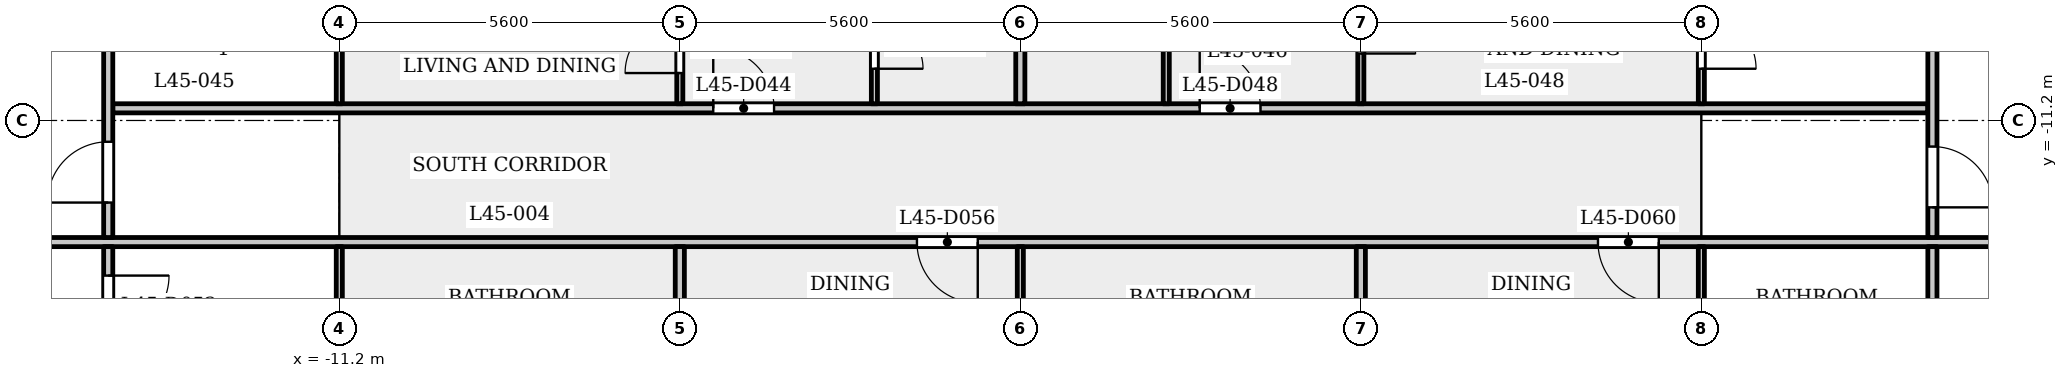
"""IFC4 building model, lengths in metres.
Left out: names, types, materials, properties, quantities, classifications, styles, units other than length and angle.
Written with IfcOpenShell. Run it as: python <this file> out.ifc"""

import sys

from ifc_helpers import new_model, si_unit, direction, frame, frame_2d, origin, place, context, subcontext, project, spatial, rectangle, extrude, element, fill, save


model = new_model("IFC4")
c1 = context("Model", 3, precision=1e-05, world=origin(), true_north=direction((0.0, 1.0)))
c2 = subcontext(c1, "Body", "Model", "MODEL_VIEW")
j1 = project(units=[si_unit("LENGTHUNIT", "METRE"), si_unit("PLANEANGLEUNIT", "RADIAN")], contexts=[c1])
p1 = place(None, origin())
s1 = spatial("IfcSite", under=j1, at=p1, CompositionType="ELEMENT")
p2 = place(p1, origin())
s2 = spatial("IfcBuilding", under=s1, at=p2, CompositionType="ELEMENT")
p3 = place(p2, frame((0.0, 0.0, 174.6)))
s3 = spatial("IfcBuildingStorey", under=s2, at=p3, CompositionType="ELEMENT", Elevation=174.6)
p4 = place(p3, frame((-17.4, -13.2, 0.0), z_axis=(0.0, 0.0, 1.0), x_axis=(1.0, 0.0, 0.0)))
e1 = element("IfcWall", 1, at=p4, inside=s3, PredefinedType="PARTITIONING", context=c2, shape_type="SweptSolid", body=[
    extrude(rectangle(XDim=34.8, YDim=0.15, at=frame_2d((17.4, 0.0))), origin(), (0.0, 0.0, 1.0), 3.15),
])
p5 = place(p4, frame((0.15, 0.0, 0.0)))
e2 = element("IfcOpeningElement", 2, at=p5, cuts=e1, PredefinedType="OPENING", context=c2, shape_type="SweptSolid", body=[
    extrude(rectangle(XDim=1.0, YDim=2.1, at=frame_2d((0.5, 1.05))), frame((0.0, 0.085, 0.0), z_axis=(0.0, -1.0, 0.0), x_axis=(1.0, 0.0, 0.0)), (0.0, 0.0, 1.0), 0.17),
])
p6 = place(p4, frame((33.55, 0.0, 0.0)))
e3 = element("IfcOpeningElement", 3, at=p6, cuts=e1, PredefinedType="OPENING", context=c2, shape_type="SweptSolid", body=[
    extrude(rectangle(XDim=1.0, YDim=2.1, at=frame_2d((0.5, 1.05))), frame((0.0, 0.085, 0.0), z_axis=(0.0, -1.0, 0.0), x_axis=(1.0, 0.0, 0.0)), (0.0, 0.0, 1.0), 0.17),
])
p7 = place(p4, frame((15.7, 0.0, 0.0)))
e4 = element("IfcOpeningElement", 4, at=p7, cuts=e1, PredefinedType="OPENING", context=c2, shape_type="SweptSolid", body=[
    extrude(rectangle(XDim=1.0, YDim=2.1, at=frame_2d((0.5, 1.05))), frame((0.0, 0.085, 0.0), z_axis=(0.0, -1.0, 0.0), x_axis=(1.0, 0.0, 0.0)), (0.0, 0.0, 1.0), 0.17),
])
p8 = place(p4, frame((26.9, 0.0, 0.0)))
e5 = element("IfcOpeningElement", 5, at=p8, cuts=e1, PredefinedType="OPENING", context=c2, shape_type="SweptSolid", body=[
    extrude(rectangle(XDim=1.0, YDim=2.1, at=frame_2d((0.5, 1.05))), frame((0.0, 0.085, 0.0), z_axis=(0.0, -1.0, 0.0), x_axis=(1.0, 0.0, 0.0)), (0.0, 0.0, 1.0), 0.17),
])
p9 = place(p3, frame((-14.925, -11.0, 0.0), z_axis=(0.0, 0.0, 1.0), x_axis=(1.0, 0.0, 0.0)))
e6 = element("IfcWall", 6, at=p9, inside=s3, PredefinedType="PARTITIONING", context=c2, shape_type="SweptSolid", body=[
    extrude(rectangle(XDim=29.85, YDim=0.15, at=frame_2d((14.925, 0.0))), origin(), (0.0, 0.0, 1.0), 3.15),
])
p10 = place(p9, frame((9.875, 0.0, 0.0)))
e7 = element("IfcOpeningElement", 7, at=p10, cuts=e6, PredefinedType="OPENING", context=c2, shape_type="SweptSolid", body=[
    extrude(rectangle(XDim=1.0, YDim=2.1, at=frame_2d((0.5, 1.05))), frame((0.0, 0.085, 0.0), z_axis=(0.0, -1.0, 0.0), x_axis=(1.0, 0.0, 0.0)), (0.0, 0.0, 1.0), 0.17),
])
p11 = place(p9, frame((17.875, 0.0, 0.0)))
e8 = element("IfcOpeningElement", 8, at=p11, cuts=e6, PredefinedType="OPENING", context=c2, shape_type="SweptSolid", body=[
    extrude(rectangle(XDim=1.0, YDim=2.1, at=frame_2d((0.5, 1.05))), frame((0.0, 0.085, 0.0), z_axis=(0.0, -1.0, 0.0), x_axis=(1.0, 0.0, 0.0)), (0.0, 0.0, 1.0), 0.17),
])
p12 = place(p3, frame((-15.0, -15.325, 0.0), z_axis=(0.0, 0.0, 1.0), x_axis=(0.0, 1.0, 0.0)))
e9 = element("IfcWall", 9, at=p12, inside=s3, PredefinedType="PARTITIONING", context=c2, shape_type="SweptSolid", body=[
    extrude(rectangle(XDim=2.05, YDim=0.15, at=frame_2d((1.025, 0.0))), origin(), (0.0, 0.0, 1.0), 3.15),
])
p13 = place(p12, frame((0.574, 0.0, 0.0)))
e10 = element("IfcOpeningElement", 10, at=p13, cuts=e9, PredefinedType="OPENING", context=c2, shape_type="SweptSolid", body=[
    extrude(rectangle(XDim=1.0, YDim=2.1, at=frame_2d((0.5, 1.05))), frame((0.0, 0.085, 0.0), z_axis=(0.0, -1.0, 0.0), x_axis=(1.0, 0.0, 0.0)), (0.0, 0.0, 1.0), 0.17),
])
p14 = place(p3, frame((-15.0, -13.125, 0.0), z_axis=(0.0, 0.0, 1.0), x_axis=(0.0, 1.0, 0.0)))
e11 = element("IfcWall", 11, at=p14, inside=s3, PredefinedType="PARTITIONING", context=c2, shape_type="SweptSolid", body=[
    extrude(rectangle(XDim=6.356, YDim=0.15, at=frame_2d((3.178, 0.0))), origin(), (0.0, 0.0, 1.0), 3.15),
])
p15 = place(p14, frame((0.575, 0.0, 0.0)))
e12 = element("IfcOpeningElement", 12, at=p15, cuts=e11, PredefinedType="OPENING", context=c2, shape_type="SweptSolid", body=[
    extrude(rectangle(XDim=1.0, YDim=2.1, at=frame_2d((0.5, 1.05))), frame((0.0, 0.085, 0.0), z_axis=(0.0, -1.0, 0.0), x_axis=(1.0, 0.0, 0.0)), (0.0, 0.0, 1.0), 0.17),
])
p16 = place(p3, frame((-11.2, -15.85, 0.0), z_axis=(0.0, 0.0, 1.0), x_axis=(0.0, 1.0, 0.0)))
e13 = element("IfcWall", 13, at=p16, inside=s3, PredefinedType="PARTITIONING", context=c2, shape_type="SweptSolid", body=[
    extrude(rectangle(XDim=2.575, YDim=0.1, at=frame_2d((1.288, 0.0))), origin(), (0.0, 0.0, 1.0), 3.15),
])
p17 = place(p3, frame((-11.2, -10.925, 0.0), z_axis=(0.0, 0.0, 1.0), x_axis=(0.0, 1.0, 0.0)))
e14 = element("IfcWall", 14, at=p17, inside=s3, PredefinedType="PARTITIONING", context=c2, shape_type="SweptSolid", body=[
    extrude(rectangle(XDim=3.605, YDim=0.1, at=frame_2d((1.802, 0.0))), origin(), (0.0, 0.0, 1.0), 3.15),
])
p18 = place(p17, frame((1.005, 0.0, 0.0)))
e15 = element("IfcOpeningElement", 15, at=p18, cuts=e14, PredefinedType="OPENING", context=c2, shape_type="SweptSolid", body=[
    extrude(rectangle(XDim=0.9, YDim=2.1, at=frame_2d((0.45, 1.05))), frame((0.0, 0.06, 0.0), z_axis=(0.0, -1.0, 0.0), x_axis=(1.0, 0.0, 0.0)), (0.0, 0.0, 1.0), 0.12),
])
p19 = place(p3, frame((-5.6, -10.925, 0.0), z_axis=(0.0, 0.0, 1.0), x_axis=(0.0, 1.0, 0.0)))
e16 = element("IfcWall", 16, at=p19, inside=s3, PredefinedType="PARTITIONING", context=c2, shape_type="SweptSolid", body=[
    extrude(rectangle(XDim=3.605, YDim=0.1, at=frame_2d((1.802, 0.0))), origin(), (0.0, 0.0, 1.0), 3.15),
])
p20 = place(p19, frame((0.505, 0.0, 0.0)))
e17 = element("IfcOpeningElement", 17, at=p20, cuts=e16, PredefinedType="OPENING", context=c2, shape_type="SweptSolid", body=[
    extrude(rectangle(XDim=0.9, YDim=2.1, at=frame_2d((0.45, 1.05))), frame((0.0, 0.06, 0.0), z_axis=(0.0, -1.0, 0.0), x_axis=(1.0, 0.0, 0.0)), (0.0, 0.0, 1.0), 0.12),
])
p21 = place(p3, frame((-5.6, -15.85, 0.0), z_axis=(0.0, 0.0, 1.0), x_axis=(0.0, 1.0, 0.0)))
e18 = element("IfcWall", 18, at=p21, inside=s3, PredefinedType="PARTITIONING", context=c2, shape_type="SweptSolid", body=[
    extrude(rectangle(XDim=2.575, YDim=0.15, at=frame_2d((1.288, 0.0))), origin(), (0.0, 0.0, 1.0), 3.15),
])
p22 = place(p3, frame((-2.4, -10.925, 0.0), z_axis=(0.0, 0.0, 1.0), x_axis=(0.0, 1.0, 0.0)))
e19 = element("IfcWall", 19, at=p22, inside=s3, PredefinedType="PARTITIONING", context=c2, shape_type="SweptSolid", body=[
    extrude(rectangle(XDim=3.605, YDim=0.1, at=frame_2d((1.802, 0.0))), origin(), (0.0, 0.0, 1.0), 3.15),
])
p23 = place(p22, frame((0.576, 0.0, 0.0)))
e20 = element("IfcOpeningElement", 20, at=p23, cuts=e19, PredefinedType="OPENING", context=c2, shape_type="SweptSolid", body=[
    extrude(rectangle(XDim=0.8, YDim=2.1, at=frame_2d((0.4, 1.05))), frame((0.0, 0.06, 0.0), z_axis=(0.0, -1.0, 0.0), x_axis=(1.0, 0.0, 0.0)), (0.0, 0.0, 1.0), 0.12),
])
p24 = place(p3, frame((0.0, -15.85, 0.0), z_axis=(0.0, 0.0, 1.0), x_axis=(0.0, 1.0, 0.0)))
e21 = element("IfcWall", 21, at=p24, inside=s3, PredefinedType="PARTITIONING", context=c2, shape_type="SweptSolid", body=[
    extrude(rectangle(XDim=2.575, YDim=0.1, at=frame_2d((1.288, 0.0))), origin(), (0.0, 0.0, 1.0), 3.15),
])
p25 = place(p3, frame((0.0, -10.925, 0.0), z_axis=(0.0, 0.0, 1.0), x_axis=(0.0, 1.0, 0.0)))
e22 = element("IfcWall", 22, at=p25, inside=s3, PredefinedType="PARTITIONING", context=c2, shape_type="SweptSolid", body=[
    extrude(rectangle(XDim=3.605, YDim=0.15, at=frame_2d((1.802, 0.0))), origin(), (0.0, 0.0, 1.0), 3.15),
])
p26 = place(p3, frame((2.4, -10.925, 0.0), z_axis=(0.0, 0.0, 1.0), x_axis=(0.0, 1.0, 0.0)))
e23 = element("IfcWall", 23, at=p26, inside=s3, PredefinedType="PARTITIONING", context=c2, shape_type="SweptSolid", body=[
    extrude(rectangle(XDim=3.605, YDim=0.1, at=frame_2d((1.802, 0.0))), origin(), (0.0, 0.0, 1.0), 3.15),
])
p27 = place(p26, frame((2.355, 0.0, 0.0)))
e24 = element("IfcOpeningElement", 24, at=p27, cuts=e23, PredefinedType="OPENING", context=c2, shape_type="SweptSolid", body=[
    extrude(rectangle(XDim=0.8, YDim=2.1, at=frame_2d((0.4, 1.05))), frame((0.0, 0.06, 0.0), z_axis=(0.0, -1.0, 0.0), x_axis=(1.0, 0.0, 0.0)), (0.0, 0.0, 1.0), 0.12),
])
p28 = place(p3, frame((5.6, -10.925, 0.0), z_axis=(0.0, 0.0, 1.0), x_axis=(0.0, 1.0, 0.0)))
e25 = element("IfcWall", 25, at=p28, inside=s3, PredefinedType="PARTITIONING", context=c2, shape_type="SweptSolid", body=[
    extrude(rectangle(XDim=3.605, YDim=0.1, at=frame_2d((1.802, 0.0))), origin(), (0.0, 0.0, 1.0), 3.15),
])
p29 = place(p28, frame((0.826, 0.0, 0.0)))
e26 = element("IfcOpeningElement", 26, at=p29, cuts=e25, PredefinedType="OPENING", context=c2, shape_type="SweptSolid", body=[
    extrude(rectangle(XDim=0.9, YDim=2.1, at=frame_2d((0.45, 1.05))), frame((0.0, 0.06, 0.0), z_axis=(0.0, -1.0, 0.0), x_axis=(1.0, 0.0, 0.0)), (0.0, 0.0, 1.0), 0.12),
])
p30 = place(p3, frame((5.6, -15.85, 0.0), z_axis=(0.0, 0.0, 1.0), x_axis=(0.0, 1.0, 0.0)))
e27 = element("IfcWall", 27, at=p30, inside=s3, PredefinedType="PARTITIONING", context=c2, shape_type="SweptSolid", body=[
    extrude(rectangle(XDim=2.575, YDim=0.15, at=frame_2d((1.288, 0.0))), origin(), (0.0, 0.0, 1.0), 3.15),
])
p31 = place(p3, frame((11.2, -15.85, 0.0), z_axis=(0.0, 0.0, 1.0), x_axis=(0.0, 1.0, 0.0)))
e28 = element("IfcWall", 28, at=p31, inside=s3, PredefinedType="PARTITIONING", context=c2, shape_type="SweptSolid", body=[
    extrude(rectangle(XDim=2.575, YDim=0.1, at=frame_2d((1.288, 0.0))), origin(), (0.0, 0.0, 1.0), 3.15),
])
p32 = place(p3, frame((11.2, -10.925, 0.0), z_axis=(0.0, 0.0, 1.0), x_axis=(0.0, 1.0, 0.0)))
e29 = element("IfcWall", 29, at=p32, inside=s3, PredefinedType="PARTITIONING", context=c2, shape_type="SweptSolid", body=[
    extrude(rectangle(XDim=3.605, YDim=0.1, at=frame_2d((1.802, 0.0))), origin(), (0.0, 0.0, 1.0), 3.15),
])
p33 = place(p32, frame((0.576, 0.0, 0.0)))
e30 = element("IfcOpeningElement", 30, at=p33, cuts=e29, PredefinedType="OPENING", context=c2, shape_type="SweptSolid", body=[
    extrude(rectangle(XDim=0.9, YDim=2.1, at=frame_2d((0.45, 1.05))), frame((0.0, 0.06, 0.0), z_axis=(0.0, -1.0, 0.0), x_axis=(1.0, 0.0, 0.0)), (0.0, 0.0, 1.0), 0.12),
])
p34 = place(p3, frame((15.0, -15.325, 0.0), z_axis=(0.0, 0.0, 1.0), x_axis=(0.0, 1.0, 0.0)))
e31 = element("IfcWall", 31, at=p34, inside=s3, PredefinedType="PARTITIONING", context=c2, shape_type="SweptSolid", body=[
    extrude(rectangle(XDim=2.05, YDim=0.15, at=frame_2d((1.025, 0.0))), origin(), (0.0, 0.0, 1.0), 3.15),
])
p35 = place(p3, frame((15.0, -13.125, 0.0), z_axis=(0.0, 0.0, 1.0), x_axis=(0.0, 1.0, 0.0)))
e32 = element("IfcWall", 32, at=p35, inside=s3, PredefinedType="PARTITIONING", context=c2, shape_type="SweptSolid", body=[
    extrude(rectangle(XDim=6.356, YDim=0.15, at=frame_2d((3.178, 0.0))), origin(), (0.0, 0.0, 1.0), 3.15),
])
p36 = place(p35, frame((0.496, 0.0, 0.0)))
e33 = element("IfcOpeningElement", 33, at=p36, cuts=e32, PredefinedType="OPENING", context=c2, shape_type="SweptSolid", body=[
    extrude(rectangle(XDim=1.0, YDim=2.1, at=frame_2d((0.5, 1.05))), frame((0.0, 0.085, 0.0), z_axis=(0.0, -1.0, 0.0), x_axis=(1.0, 0.0, 0.0)), (0.0, 0.0, 1.0), 0.17),
])
p37 = place(p15, origin())
e34 = element("IfcDoor", 34, at=p37, inside=s3, OperationType="SINGLE_SWING_RIGHT", PredefinedType="DOOR", context=c2, shape_type="SweptSolid", body=[
    extrude(rectangle(XDim=1.0, YDim=2.1, at=frame_2d((0.5, 1.05))), frame((0.0, 0.025, 0.0), z_axis=(0.0, -1.0, 0.0), x_axis=(1.0, 0.0, 0.0)), (0.0, 0.0, 1.0), 0.05),
])
fill(e12, e34)
p38 = place(p36, origin())
e35 = element("IfcDoor", 35, at=p38, inside=s3, OperationType="SINGLE_SWING_LEFT", PredefinedType="DOOR", context=c2, shape_type="SweptSolid", body=[
    extrude(rectangle(XDim=1.0, YDim=2.1, at=frame_2d((0.5, 1.05))), frame((0.0, 0.025, 0.0), z_axis=(0.0, -1.0, 0.0), x_axis=(1.0, 0.0, 0.0)), (0.0, 0.0, 1.0), 0.05),
])
fill(e33, e35)
p39 = place(p10, origin())
e36 = element("IfcDoor", 36, at=p39, inside=s3, OperationType="SINGLE_SWING_RIGHT", PredefinedType="DOOR", context=c2, shape_type="SweptSolid", body=[
    extrude(rectangle(XDim=1.0, YDim=2.1, at=frame_2d((0.5, 1.05))), frame((0.0, 0.025, 0.0), z_axis=(0.0, -1.0, 0.0), x_axis=(1.0, 0.0, 0.0)), (0.0, 0.0, 1.0), 0.05),
])
fill(e7, e36)
p40 = place(p23, origin())
e37 = element("IfcDoor", 37, at=p40, inside=s3, OperationType="SINGLE_SWING_LEFT", PredefinedType="DOOR", context=c2, shape_type="SweptSolid", body=[
    extrude(rectangle(XDim=0.8, YDim=2.1, at=frame_2d((0.4, 1.05))), frame((0.0, 0.025, 0.0), z_axis=(0.0, -1.0, 0.0), x_axis=(1.0, 0.0, 0.0)), (0.0, 0.0, 1.0), 0.05),
])
fill(e20, e37)
p41 = place(p20, origin())
e38 = element("IfcDoor", 38, at=p41, inside=s3, OperationType="SINGLE_SWING_RIGHT", PredefinedType="DOOR", context=c2, shape_type="SweptSolid", body=[
    extrude(rectangle(XDim=0.9, YDim=2.1, at=frame_2d((0.45, 1.05))), frame((0.0, 0.025, 0.0), z_axis=(0.0, -1.0, 0.0), x_axis=(1.0, 0.0, 0.0)), (0.0, 0.0, 1.0), 0.05),
])
fill(e17, e38)
p42 = place(p11, origin())
e39 = element("IfcDoor", 39, at=p42, inside=s3, OperationType="SINGLE_SWING_RIGHT", PredefinedType="DOOR", context=c2, shape_type="SweptSolid", body=[
    extrude(rectangle(XDim=1.0, YDim=2.1, at=frame_2d((0.5, 1.05))), frame((0.0, 0.025, 0.0), z_axis=(0.0, -1.0, 0.0), x_axis=(1.0, 0.0, 0.0)), (0.0, 0.0, 1.0), 0.05),
])
fill(e8, e39)
p43 = place(p29, origin())
e40 = element("IfcDoor", 40, at=p43, inside=s3, OperationType="SINGLE_SWING_LEFT", PredefinedType="DOOR", context=c2, shape_type="SweptSolid", body=[
    extrude(rectangle(XDim=0.9, YDim=2.1, at=frame_2d((0.45, 1.05))), frame((0.0, 0.025, 0.0), z_axis=(0.0, -1.0, 0.0), x_axis=(1.0, 0.0, 0.0)), (0.0, 0.0, 1.0), 0.05),
])
fill(e26, e40)
p44 = place(p33, origin())
e41 = element("IfcDoor", 41, at=p44, inside=s3, OperationType="SINGLE_SWING_LEFT", PredefinedType="DOOR", context=c2, shape_type="SweptSolid", body=[
    extrude(rectangle(XDim=0.9, YDim=2.1, at=frame_2d((0.45, 1.05))), frame((0.0, 0.025, 0.0), z_axis=(0.0, -1.0, 0.0), x_axis=(1.0, 0.0, 0.0)), (0.0, 0.0, 1.0), 0.05),
])
fill(e30, e41)
p45 = place(p13, origin())
e42 = element("IfcDoor", 42, at=p45, inside=s3, OperationType="SINGLE_SWING_RIGHT", PredefinedType="DOOR", context=c2, shape_type="SweptSolid", body=[
    extrude(rectangle(XDim=1.0, YDim=2.1, at=frame_2d((0.5, 1.05))), frame((0.0, 0.025, 0.0), z_axis=(0.0, -1.0, 0.0), x_axis=(1.0, 0.0, 0.0)), (0.0, 0.0, 1.0), 0.05),
])
fill(e10, e42)
p46 = place(p7, origin())
e43 = element("IfcDoor", 43, at=p46, inside=s3, OperationType="SINGLE_SWING_RIGHT", PredefinedType="DOOR", context=c2, shape_type="SweptSolid", body=[
    extrude(rectangle(XDim=1.0, YDim=2.1, at=frame_2d((0.5, 1.05))), frame((0.0, 0.025, 0.0), z_axis=(0.0, -1.0, 0.0), x_axis=(1.0, 0.0, 0.0)), (0.0, 0.0, 1.0), 0.05),
])
fill(e4, e43)
p47 = place(p8, origin())
e44 = element("IfcDoor", 44, at=p47, inside=s3, OperationType="SINGLE_SWING_RIGHT", PredefinedType="DOOR", context=c2, shape_type="SweptSolid", body=[
    extrude(rectangle(XDim=1.0, YDim=2.1, at=frame_2d((0.5, 1.05))), frame((0.0, 0.025, 0.0), z_axis=(0.0, -1.0, 0.0), x_axis=(1.0, 0.0, 0.0)), (0.0, 0.0, 1.0), 0.05),
])
fill(e5, e44)
save(model, sys.argv[1])
